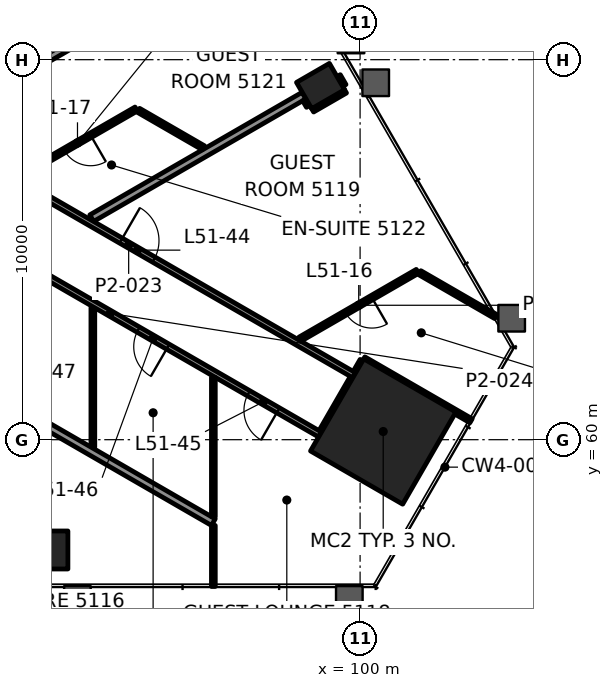
"""IFC4 building model, lengths in metres.
Left out: names, types, materials, properties, quantities, classifications, styles, units other than length and angle.
Written with IfcOpenShell. Run it as: python <this file> out.ifc"""

import sys

from ifc_helpers import new_model, si_unit, direction, frame, frame_2d, origin, origin_2d, place, context, subcontext, project, spatial, rectangle, hollow_rectangle, extrude, element, fill, save


model = new_model("IFC4")
c1 = context("Model", 3, precision=1e-05, world=origin(), true_north=direction((0.0, 1.0)))
c2 = subcontext(c1, "Body", "Model", "MODEL_VIEW")
j1 = project(units=[si_unit("LENGTHUNIT", "METRE"), si_unit("PLANEANGLEUNIT", "RADIAN")], contexts=[c1])
p1 = place(None, origin())
s1 = spatial("IfcSite", under=j1, at=p1, CompositionType="ELEMENT")
p2 = place(p1, origin())
s2 = spatial("IfcBuilding", under=s1, at=p2, CompositionType="ELEMENT")
p3 = place(p2, frame((0.0, 0.0, 218.2)))
s3 = spatial("IfcBuildingStorey", under=s2, at=p3, CompositionType="ELEMENT", Elevation=218.2)
p4 = place(p3, frame((100.608, 60.215, 0.0), z_axis=(0.0, 0.0, 1.0), x_axis=(0.5, 0.866025403784, 0.0)))
e1 = element("IfcColumn", 1, at=p4, inside=s3, PredefinedType="COLUMN", context=c2, shape_type="SweptSolid", body=[
    extrude(rectangle(XDim=2.8, YDim=2.8, at=origin_2d()), origin(), (0.0, 0.0, 1.0), 3.9),
])
for number, where, z_axis, x_axis in (
    (2, (91.911, 57.097, -0.0), (0.0, 0.0, 1.0), (1.0, 0.0, 0.0)),
    (3, (98.96, 69.306, -0.0), (0.0, 0.0, 1.0), (-0.5, 0.866, 0.0)),
):
    element("IfcColumn", number, at=place(p3, frame(where, z_axis=z_axis, x_axis=x_axis)), inside=s3, PredefinedType="COLUMN", context=c2, shape_type="SweptSolid", body=[
        extrude(hollow_rectangle(XDim=0.8, YDim=1.0, WallThickness=0.05, at=origin_2d()), origin(), (0.0, 0.0, 1.0), 3.9),
    ])
p5 = place(p3, frame((101.509, 64.429, 0.0), z_axis=(0.0, 0.0, 1.0), x_axis=(-0.866028357664, -0.499994883695, 0.0)))
e4 = element("IfcWall", 4, at=p5, inside=s3, PredefinedType="PARTITIONING", context=c2, shape_type="SweptSolid", body=[
    extrude(rectangle(XDim=3.568, YDim=0.12, at=frame_2d((1.784, 0.0))), origin(), (0.0, 0.0, 1.0), 3.1),
])
p6 = place(p5, frame((1.384, 0.0, 0.0)))
e5 = element("IfcOpeningElement", 5, at=p6, cuts=e4, PredefinedType="OPENING", context=c2, shape_type="SweptSolid", body=[
    extrude(rectangle(XDim=0.8, YDim=2.1, at=frame_2d((0.4, 1.05))), frame((0.0, 0.07, 0.0), z_axis=(0.0, -1.0, 0.0), x_axis=(1.0, 0.0, 0.0)), (0.0, 0.0, 1.0), 0.14),
])
p7 = place(p3, frame((98.727, 68.71, 0.0), z_axis=(0.0, 0.0, 1.0), x_axis=(0.866083827272, 0.499898793895, 0.0)))
e6 = element("IfcWall", 6, at=p7, inside=s3, PredefinedType="PARTITIONING", context=c2, shape_type="SweptSolid", body=[
    extrude(rectangle(XDim=0.999, YDim=0.2, at=frame_2d((0.5, 0.0))), origin(), (0.0, 0.0, 1.0), 3.1),
])
p8 = place(p3, frame((92.938, 65.83, 0.0), z_axis=(0.0, 0.0, 1.0), x_axis=(0.866041300655, 0.499972464802, 0.0)))
e7 = element("IfcWall", 7, at=p8, inside=s3, PredefinedType="PARTITIONING", context=c2, shape_type="SweptSolid", body=[
    extrude(rectangle(XDim=6.452, YDim=0.2, at=frame_2d((3.226, 0.0))), origin(), (0.0, 0.0, 1.0), 3.1),
])
p9 = place(p3, frame((94.109, 68.702, 0.0), z_axis=(0.0, 0.0, 1.0), x_axis=(-0.866028357664, -0.499994883695, 0.0)))
e8 = element("IfcWall", 8, at=p9, inside=s3, PredefinedType="PARTITIONING", context=c2, shape_type="SweptSolid", body=[
    extrude(rectangle(XDim=3.568, YDim=0.12, at=frame_2d((1.784, 0.0))), origin(), (0.0, 0.0, 1.0), 3.1),
])
p10 = place(p9, frame((1.384, 0.0, 0.0)))
e9 = element("IfcOpeningElement", 9, at=p10, cuts=e8, PredefinedType="OPENING", context=c2, shape_type="SweptSolid", body=[
    extrude(rectangle(XDim=0.8, YDim=2.1, at=frame_2d((0.4, 1.05))), frame((0.0, 0.07, 0.0), z_axis=(0.0, -1.0, 0.0), x_axis=(1.0, 0.0, 0.0)), (0.0, 0.0, 1.0), 0.14),
])
p11 = place(p3, frame((88.711, 68.27, 0.0), z_axis=(0.0, 0.0, 1.0), x_axis=(0.866024593981, 0.500001402618, 0.0)))
e10 = element("IfcWall", 10, at=p11, inside=s3, PredefinedType="PARTITIONING", context=c2, shape_type="SweptSolid", body=[
    extrude(rectangle(XDim=10.354, YDim=0.2, at=frame_2d((5.177, 0.0))), origin(), (0.0, 0.0, 1.0), 3.022),
])
p12 = place(p3, frame((98.984, 60.201, 0.0), z_axis=(0.0, 0.0, 1.0), x_axis=(0.499991515992, 0.866030301974, 0.0)))
e11 = element("IfcWall", 11, at=p12, inside=s3, PredefinedType="PARTITIONING", context=c2, shape_type="SweptSolid", body=[
    extrude(rectangle(XDim=1.649, YDim=0.15, at=frame_2d((0.825, 0.0))), origin(), (0.0, 0.0, 1.0), 2.947),
])
p13 = place(p3, frame((96.139, 56.137, 0.0), z_axis=(0.0, 0.0, 1.0), x_axis=(0.0, 1.0, 0.0)))
e12 = element("IfcWall", 12, at=p13, inside=s3, PredefinedType="PARTITIONING", context=c2, shape_type="SweptSolid", body=[
    extrude(rectangle(XDim=1.606, YDim=0.1, at=frame_2d((0.803, 0.0))), origin(), (0.0, 0.0, 1.0), 3.1),
])
p14 = place(p3, frame((92.968, 59.806, 0.0), z_axis=(0.0, 0.0, 1.0), x_axis=(0.0, 1.0, 0.0)))
e13 = element("IfcWall", 13, at=p14, inside=s3, PredefinedType="PARTITIONING", context=c2, shape_type="SweptSolid", body=[
    extrude(rectangle(XDim=3.664, YDim=0.1, at=frame_2d((1.832, 0.0))), origin(), (0.0, 0.0, 1.0), 3.1),
])
p15 = place(p3, frame((99.542, 69.296, 0.0), z_axis=(0.0, 0.0, 1.0), x_axis=(-0.500005339912, 0.866022320763, 0.0)))
e14 = element("IfcWall", 14, at=p15, inside=s3, PredefinedType="PARTITIONING", context=c2, shape_type="SweptSolid", body=[
    extrude(rectangle(XDim=0.299, YDim=0.2, at=frame_2d((0.149, 0.0))), origin(), (0.0, 0.0, 1.0), 3.1),
])
p16 = place(p3, frame((98.676, 68.796, 0.0), z_axis=(0.0, 0.0, 1.0), x_axis=(-0.4999705729, 0.866042392862, 0.0)))
e15 = element("IfcWall", 15, at=p16, inside=s3, PredefinedType="PARTITIONING", context=c2, shape_type="SweptSolid", body=[
    extrude(rectangle(XDim=0.199, YDim=0.2, at=frame_2d((0.099, 0.0))), origin(), (0.0, 0.0, 1.0), 3.1),
])
p17 = place(p3, frame((103.571, 63.239, 0.0), z_axis=(0.0, 0.0, 1.0), x_axis=(-0.866011447264, 0.500024172624, 0.0)))
e16 = element("IfcWall", 16, at=p17, inside=s3, PredefinedType="PARTITIONING", context=c2, shape_type="SweptSolid", body=[
    extrude(rectangle(XDim=2.312, YDim=0.12, at=frame_2d((1.156, 0.0))), origin(), (0.0, 0.0, 1.0), 3.1),
])
p18 = place(p3, frame((95.877, 67.681, 0.0), z_axis=(0.0, 0.0, 1.0), x_axis=(-0.866002090371, 0.500040377843, 0.0)))
e17 = element("IfcWall", 17, at=p18, inside=s3, PredefinedType="PARTITIONING", context=c2, shape_type="SweptSolid", body=[
    extrude(rectangle(XDim=1.972, YDim=0.12, at=frame_2d((0.986, 0.0))), origin(), (0.0, 0.0, 1.0), 3.1),
])
p19 = place(p3, frame((102.919, 60.498, 0.0), z_axis=(0.0, 0.0, 1.0), x_axis=(-0.866003472149, 0.500037984783, 0.0)))
e18 = element("IfcWall", 18, at=p19, inside=s3, PredefinedType="PARTITIONING", context=c2, shape_type="SweptSolid", body=[
    extrude(rectangle(XDim=3.26, YDim=0.12, at=frame_2d((1.63, 0.0))), origin(), (0.0, 0.0, 1.0), 3.1),
])
p20 = place(p3, frame((87.975, 68.548, 0.0), z_axis=(0.0, 0.0, 1.0), x_axis=(0.866024823711, -0.500001004715, 0.0)))
e19 = element("IfcWall", 19, at=p20, inside=s3, PredefinedType="PARTITIONING", context=c2, shape_type="SweptSolid", body=[
    extrude(rectangle(XDim=13.707, YDim=0.15, at=frame_2d((6.854, 0.0))), origin(), (0.0, 0.0, 1.0), 3.1),
])
p21 = place(p20, frame((1.283, 0.0, 0.0)))
e20 = element("IfcOpeningElement", 20, at=p21, cuts=e19, PredefinedType="OPENING", context=c2, shape_type="SweptSolid", body=[
    extrude(rectangle(XDim=1.0, YDim=2.1, at=frame_2d((0.5, 1.05))), frame((0.0, 0.085, 0.0), z_axis=(0.0, -1.0, 0.0), x_axis=(1.0, 0.0, 0.0)), (0.0, 0.0, 1.0), 0.17),
])
p22 = place(p20, frame((6.62, 0.0, 0.0)))
e21 = element("IfcOpeningElement", 21, at=p22, cuts=e19, PredefinedType="OPENING", context=c2, shape_type="SweptSolid", body=[
    extrude(rectangle(XDim=1.0, YDim=2.1, at=frame_2d((0.5, 1.05))), frame((0.0, 0.085, 0.0), z_axis=(0.0, -1.0, 0.0), x_axis=(1.0, 0.0, 0.0)), (0.0, 0.0, 1.0), 0.17),
])
p23 = place(p3, frame((98.945, 60.136, 0.0), z_axis=(0.0, 0.0, 1.0), x_axis=(-0.866024604137, 0.500001385028, 0.0)))
e22 = element("IfcWall", 22, at=p23, inside=s3, PredefinedType="PARTITIONING", context=c2, shape_type="SweptSolid", body=[
    extrude(rectangle(XDim=12.754, YDim=0.15, at=frame_2d((6.377, 0.0))), origin(), (0.0, 0.0, 1.0), 2.947),
])
p24 = place(p23, frame((1.271, 0.0, 0.0)))
e23 = element("IfcOpeningElement", 23, at=p24, cuts=e22, PredefinedType="OPENING", context=c2, shape_type="SweptSolid", body=[
    extrude(rectangle(XDim=0.9, YDim=2.1, at=frame_2d((0.45, 1.05))), frame((0.0, 0.085, 0.0), z_axis=(0.0, -1.0, 0.0), x_axis=(1.0, 0.0, 0.0)), (0.0, 0.0, 1.0), 0.17),
])
p25 = place(p23, frame((4.621, 0.0, 0.0)))
e24 = element("IfcOpeningElement", 24, at=p25, cuts=e22, PredefinedType="OPENING", context=c2, shape_type="SweptSolid", body=[
    extrude(rectangle(XDim=0.9, YDim=2.1, at=frame_2d((0.45, 1.05))), frame((0.0, 0.085, 0.0), z_axis=(0.0, -1.0, 0.0), x_axis=(1.0, 0.0, 0.0)), (0.0, 0.0, 1.0), 0.17),
])
p26 = place(p23, frame((8.282, 0.0, 0.0)))
e25 = element("IfcOpeningElement", 25, at=p26, cuts=e22, PredefinedType="OPENING", context=c2, shape_type="SweptSolid", body=[
    extrude(rectangle(XDim=0.9, YDim=2.1, at=frame_2d((0.45, 1.05))), frame((0.0, 0.085, 0.0), z_axis=(0.0, -1.0, 0.0), x_axis=(1.0, 0.0, 0.0)), (0.0, 0.0, 1.0), 0.17),
])
p27 = place(p3, frame((96.139, 57.83, 0.0), z_axis=(0.0, 0.0, 1.0), x_axis=(-0.866014584968, 0.500018738272, 0.0)))
e26 = element("IfcWall", 26, at=p27, inside=s3, PredefinedType="PARTITIONING", context=c2, shape_type="SweptSolid", body=[
    extrude(rectangle(XDim=7.323, YDim=0.2, at=frame_2d((3.662, 0.0))), origin(), (0.0, 0.0, 1.0), 3.1),
])
p28 = place(p3, frame((99.884, 61.76, 0.0), z_axis=(0.0, 0.0, 1.0), x_axis=(0.500031897912, 0.866006986733, 0.0)))
e27 = element("IfcWall", 27, at=p28, inside=s3, PredefinedType="PARTITIONING", context=c2, shape_type="SweptSolid", body=[
    extrude(rectangle(XDim=0.364, YDim=0.15, at=frame_2d((0.182, 0.0))), origin(), (0.0, 0.0, 1.0), 3.1),
])
p29 = place(p3, frame((96.139, 57.975, 0.0), z_axis=(0.0, 0.0, 1.0), x_axis=(0.0, 1.0, 0.0)))
e28 = element("IfcWall", 28, at=p29, inside=s3, PredefinedType="PARTITIONING", context=c2, shape_type="SweptSolid", body=[
    extrude(rectangle(XDim=3.665, YDim=0.1, at=frame_2d((1.833, 0.0))), origin(), (0.0, 0.0, 1.0), 3.1),
])
p30 = place(p6, origin())
e29 = element("IfcDoor", 29, at=p30, inside=s3, OperationType="SINGLE_SWING_RIGHT", PredefinedType="DOOR", context=c2, shape_type="SweptSolid", body=[
    extrude(rectangle(XDim=0.8, YDim=2.1, at=frame_2d((0.4, 1.05))), frame((0.0, 0.025, 0.0), z_axis=(0.0, -1.0, 0.0), x_axis=(1.0, 0.0, 0.0)), (0.0, 0.0, 1.0), 0.05),
])
fill(e5, e29)
p31 = place(p10, origin())
e30 = element("IfcDoor", 30, at=p31, inside=s3, OperationType="SINGLE_SWING_RIGHT", PredefinedType="DOOR", context=c2, shape_type="SweptSolid", body=[
    extrude(rectangle(XDim=0.8, YDim=2.1, at=frame_2d((0.4, 1.05))), frame((0.0, 0.025, 0.0), z_axis=(0.0, -1.0, 0.0), x_axis=(1.0, 0.0, 0.0)), (0.0, 0.0, 1.0), 0.05),
])
fill(e9, e30)
p32 = place(p22, origin())
e31 = element("IfcDoor", 31, at=p32, inside=s3, OperationType="SINGLE_SWING_LEFT", PredefinedType="DOOR", context=c2, shape_type="SweptSolid", body=[
    extrude(rectangle(XDim=1.0, YDim=2.1, at=frame_2d((0.5, 1.05))), frame((0.0, 0.025, 0.0), z_axis=(0.0, -1.0, 0.0), x_axis=(1.0, 0.0, 0.0)), (0.0, 0.0, 1.0), 0.05),
])
fill(e21, e31)
p33 = place(p24, origin())
e32 = element("IfcDoor", 32, at=p33, inside=s3, OperationType="SINGLE_SWING_LEFT", PredefinedType="DOOR", context=c2, shape_type="SweptSolid", body=[
    extrude(rectangle(XDim=0.9, YDim=2.1, at=frame_2d((0.45, 1.05))), frame((0.0, 0.025, 0.0), z_axis=(0.0, -1.0, 0.0), x_axis=(1.0, 0.0, 0.0)), (0.0, 0.0, 1.0), 0.05),
])
fill(e23, e32)
p34 = place(p25, origin())
e33 = element("IfcDoor", 33, at=p34, inside=s3, OperationType="SINGLE_SWING_RIGHT", PredefinedType="DOOR", context=c2, shape_type="SweptSolid", body=[
    extrude(rectangle(XDim=0.9, YDim=2.1, at=frame_2d((0.45, 1.05))), frame((0.0, 0.025, 0.0), z_axis=(0.0, -1.0, 0.0), x_axis=(1.0, 0.0, 0.0)), (0.0, 0.0, 1.0), 0.05),
])
fill(e24, e33)
p35 = place(p3, origin())
p36 = place(p35, frame((102.622, 64.913, 0.15), z_axis=(0.0, 0.0, 1.0), x_axis=(-0.5, 0.866025, 0.0)))
p37 = place(p36, origin())
e34 = element("IfcWindow", 34, at=p37, inside=s3, PartitioningType="SINGLE_PANEL", PredefinedType="WINDOW", context=c2, shape_type="SweptSolid", body=[
    extrude(rectangle(XDim=2.743, YDim=3.55, at=frame_2d((1.372, 1.775))), frame((0.0, 0.03, 0.0), z_axis=(0.0, -1.0, 0.0), x_axis=(1.0, 0.0, 0.0)), (0.0, 0.0, 1.0), 0.06),
])
save(model, sys.argv[1])
